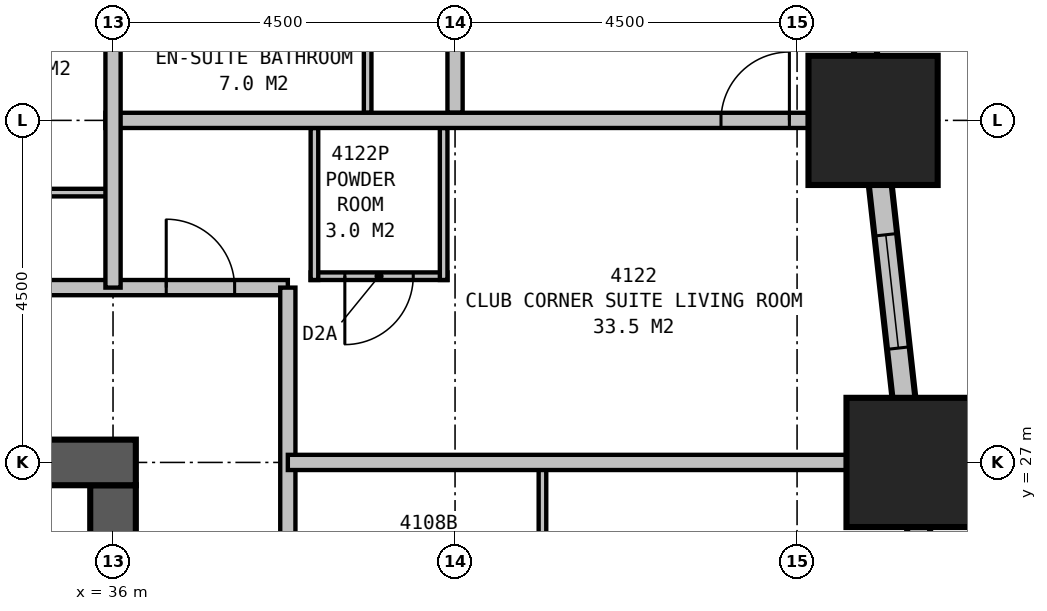
"""IFC4 building model, lengths in metres.
Left out: names, types, materials, properties, quantities, classifications, styles, units other than length and angle.
Written with IfcOpenShell. Run it as: python <this file> out.ifc"""

import sys

from ifc_helpers import new_model, si_unit, direction, frame, frame_2d, origin, origin_2d, place, context, subcontext, project, spatial, rectangle, extrude, element, fill, save


model = new_model("IFC4")
c1 = context("Model", 3, precision=1e-05, world=origin(), true_north=direction((0.0, 1.0)))
c2 = subcontext(c1, "Body", "Model", "MODEL_VIEW")
j1 = project(units=[si_unit("LENGTHUNIT", "METRE"), si_unit("PLANEANGLEUNIT", "RADIAN")], contexts=[c1])
p1 = place(None, origin())
s1 = spatial("IfcSite", under=j1, at=p1, CompositionType="ELEMENT")
p2 = place(p1, origin())
s2 = spatial("IfcBuilding", under=s1, at=p2, CompositionType="ELEMENT")
p3 = place(p2, frame((0.0, 0.0, 162.4)))
s3 = spatial("IfcBuildingStorey", under=s2, at=p3, CompositionType="ELEMENT", Elevation=162.4)
for number, where, z_axis, x_axis in (
    (1, (46.5, 27.0, 0.0), (0.0, 0.0, 1.0), (1.0, 0.0, 0.0)),
    (2, (46.0, 31.5, 0.0), (0.0, 0.0, 1.0), (1.0, 0.0, 0.0)),
):
    element("IfcColumn", number, at=place(p3, frame(where, z_axis=z_axis, x_axis=x_axis)), inside=s3, PredefinedType="COLUMN", context=c2, shape_type="SweptSolid", body=[
        extrude(rectangle(XDim=1.7, YDim=1.7, at=origin_2d()), origin(), (0.0, 0.0, 1.0), 3.5),
    ])
p4 = place(p3, frame((36.3, 27.0, 0.0), z_axis=(0.0, 0.0, 1.0), x_axis=(-1.0, 0.0, 0.0)))
e3 = element("IfcWall", 3, at=p4, inside=s3, PredefinedType="SHEAR", context=c2, shape_type="SweptSolid", body=[
    extrude(rectangle(XDim=23.1, YDim=0.6, at=frame_2d((11.55, 0.0))), origin(), (0.0, 0.0, 1.0), 3.5),
])
p5 = place(p4, frame((17.05, 0.0, 0.0)))
e4 = element("IfcOpeningElement", 4, at=p5, cuts=e3, PredefinedType="OPENING", context=c2, shape_type="SweptSolid", body=[
    extrude(rectangle(XDim=1.0, YDim=2.1, at=frame_2d((0.5, 1.05))), frame((0.0, 0.31, 0.0), z_axis=(0.0, -1.0, 0.0), x_axis=(1.0, 0.0, 0.0)), (0.0, 0.0, 1.0), 0.62),
])
p6 = place(p4, frame((12.05, 0.0, 0.0)))
e5 = element("IfcOpeningElement", 5, at=p6, cuts=e3, PredefinedType="OPENING", context=c2, shape_type="SweptSolid", body=[
    extrude(rectangle(XDim=1.0, YDim=2.1, at=frame_2d((0.5, 1.05))), frame((0.0, 0.31, 0.0), z_axis=(0.0, -1.0, 0.0), x_axis=(1.0, 0.0, 0.0)), (0.0, 0.0, 1.0), 0.62),
])
p7 = place(p4, frame((7.05, 0.0, 0.0)))
e6 = element("IfcOpeningElement", 6, at=p7, cuts=e3, PredefinedType="OPENING", context=c2, shape_type="SweptSolid", body=[
    extrude(rectangle(XDim=1.0, YDim=2.1, at=frame_2d((0.5, 1.05))), frame((0.0, 0.31, 0.0), z_axis=(0.0, -1.0, 0.0), x_axis=(1.0, 0.0, 0.0)), (0.0, 0.0, 1.0), 0.62),
])
p8 = place(p3, frame((36.0, 20.0, 0.0), z_axis=(0.0, 0.0, 1.0), x_axis=(0.0, 1.0, 0.0)))
e7 = element("IfcWall", 7, at=p8, inside=s3, PredefinedType="SHEAR", context=c2, shape_type="SweptSolid", body=[
    extrude(rectangle(XDim=6.7, YDim=0.6, at=frame_2d((3.35, 0.0))), origin(), (0.0, 0.0, 1.0), 3.5),
])
p9 = place(p3, frame((49.017, 4.351, 0.0), z_axis=(0.0, 0.0, 1.0), x_axis=(-0.110433201132, 0.993883548555, 0.0)))
e8 = element("IfcWall", 8, at=p9, inside=s3, PredefinedType="STANDARD", context=c2, shape_type="SweptSolid", body=[
    extrude(rectangle(XDim=31.994, YDim=0.3, at=frame_2d((15.997, 0.0))), origin(), (0.0, 0.0, 1.0), 2.25),
])
p10 = place(p9, frame((1.664, 0.0, 0.5)))
e9 = element("IfcOpeningElement", 9, at=p10, cuts=e8, PredefinedType="OPENING", context=c2, shape_type="SweptSolid", body=[
    extrude(rectangle(XDim=1.5, YDim=1.6, at=frame_2d((0.75, 0.8))), frame((0.0, 0.16, 0.0), z_axis=(0.0, -1.0, 0.0), x_axis=(1.0, 0.0, 0.0)), (0.0, 0.0, 1.0), 0.32),
])
p11 = place(p9, frame((6.192, 0.0, 0.5)))
e10 = element("IfcOpeningElement", 10, at=p11, cuts=e8, PredefinedType="OPENING", context=c2, shape_type="SweptSolid", body=[
    extrude(rectangle(XDim=1.5, YDim=1.6, at=frame_2d((0.75, 0.8))), frame((0.0, 0.16, 0.0), z_axis=(0.0, -1.0, 0.0), x_axis=(1.0, 0.0, 0.0)), (0.0, 0.0, 1.0), 0.32),
])
p12 = place(p9, frame((10.719, 0.0, 0.5)))
e11 = element("IfcOpeningElement", 11, at=p12, cuts=e8, PredefinedType="OPENING", context=c2, shape_type="SweptSolid", body=[
    extrude(rectangle(XDim=1.5, YDim=1.6, at=frame_2d((0.75, 0.8))), frame((0.0, 0.16, 0.0), z_axis=(0.0, -1.0, 0.0), x_axis=(1.0, 0.0, 0.0)), (0.0, 0.0, 1.0), 0.32),
])
p13 = place(p9, frame((15.247, 0.0, 0.5)))
e12 = element("IfcOpeningElement", 12, at=p13, cuts=e8, PredefinedType="OPENING", context=c2, shape_type="SweptSolid", body=[
    extrude(rectangle(XDim=1.5, YDim=1.6, at=frame_2d((0.75, 0.8))), frame((0.0, 0.16, 0.0), z_axis=(0.0, -1.0, 0.0), x_axis=(1.0, 0.0, 0.0)), (0.0, 0.0, 1.0), 0.32),
])
p14 = place(p9, frame((19.775, 0.0, 0.5)))
e13 = element("IfcOpeningElement", 13, at=p14, cuts=e8, PredefinedType="OPENING", context=c2, shape_type="SweptSolid", body=[
    extrude(rectangle(XDim=1.5, YDim=1.6, at=frame_2d((0.75, 0.8))), frame((0.0, 0.16, 0.0), z_axis=(0.0, -1.0, 0.0), x_axis=(1.0, 0.0, 0.0)), (0.0, 0.0, 1.0), 0.32),
])
p15 = place(p9, frame((24.302, 0.0, 0.5)))
e14 = element("IfcOpeningElement", 14, at=p15, cuts=e8, PredefinedType="OPENING", context=c2, shape_type="SweptSolid", body=[
    extrude(rectangle(XDim=1.5, YDim=1.6, at=frame_2d((0.75, 0.8))), frame((0.0, 0.16, 0.0), z_axis=(0.0, -1.0, 0.0), x_axis=(1.0, 0.0, 0.0)), (0.0, 0.0, 1.0), 0.32),
])
p16 = place(p9, frame((28.83, 0.0, 0.5)))
e15 = element("IfcOpeningElement", 15, at=p16, cuts=e8, PredefinedType="OPENING", context=c2, shape_type="SweptSolid", body=[
    extrude(rectangle(XDim=1.5, YDim=1.6, at=frame_2d((0.75, 0.8))), frame((0.0, 0.16, 0.0), z_axis=(0.0, -1.0, 0.0), x_axis=(1.0, 0.0, 0.0)), (0.0, 0.0, 1.0), 0.32),
])
p17 = place(p3, frame((11.2, 29.3, 0.0), z_axis=(0.0, 0.0, 1.0), x_axis=(1.0, 0.0, 0.0)))
e16 = element("IfcWall", 16, at=p17, inside=s3, PredefinedType="PARTITIONING", context=c2, shape_type="SweptSolid", body=[
    extrude(rectangle(XDim=27.1, YDim=0.2, at=frame_2d((13.55, 0.0))), origin(), (0.0, 0.0, 1.0), 3.25),
])
p18 = place(p17, frame((2.75, 0.0, 0.0)))
e17 = element("IfcOpeningElement", 17, at=p18, cuts=e16, PredefinedType="OPENING", context=c2, shape_type="SweptSolid", body=[
    extrude(rectangle(XDim=0.9, YDim=2.1, at=frame_2d((0.45, 1.05))), frame((0.0, 0.11, 0.0), z_axis=(0.0, -1.0, 0.0), x_axis=(1.0, 0.0, 0.0)), (0.0, 0.0, 1.0), 0.22),
])
p19 = place(p17, frame((9.55, 0.0, 0.0)))
e18 = element("IfcOpeningElement", 18, at=p19, cuts=e16, PredefinedType="OPENING", context=c2, shape_type="SweptSolid", body=[
    extrude(rectangle(XDim=0.9, YDim=2.1, at=frame_2d((0.45, 1.05))), frame((0.0, 0.11, 0.0), z_axis=(0.0, -1.0, 0.0), x_axis=(1.0, 0.0, 0.0)), (0.0, 0.0, 1.0), 0.22),
])
p20 = place(p17, frame((16.25, 0.0, 0.0)))
e19 = element("IfcOpeningElement", 19, at=p20, cuts=e16, PredefinedType="OPENING", context=c2, shape_type="SweptSolid", body=[
    extrude(rectangle(XDim=0.9, YDim=2.1, at=frame_2d((0.45, 1.05))), frame((0.0, 0.11, 0.0), z_axis=(0.0, -1.0, 0.0), x_axis=(1.0, 0.0, 0.0)), (0.0, 0.0, 1.0), 0.22),
])
p21 = place(p17, frame((20.75, 0.0, 0.0)))
e20 = element("IfcOpeningElement", 20, at=p21, cuts=e16, PredefinedType="OPENING", context=c2, shape_type="SweptSolid", body=[
    extrude(rectangle(XDim=0.9, YDim=2.1, at=frame_2d((0.45, 1.05))), frame((0.0, 0.11, 0.0), z_axis=(0.0, -1.0, 0.0), x_axis=(1.0, 0.0, 0.0)), (0.0, 0.0, 1.0), 0.22),
])
p22 = place(p17, frame((25.5, 0.0, 0.0)))
e21 = element("IfcOpeningElement", 21, at=p22, cuts=e16, PredefinedType="OPENING", context=c2, shape_type="SweptSolid", body=[
    extrude(rectangle(XDim=0.9, YDim=2.1, at=frame_2d((0.45, 1.05))), frame((0.0, 0.11, 0.0), z_axis=(0.0, -1.0, 0.0), x_axis=(1.0, 0.0, 0.0)), (0.0, 0.0, 1.0), 0.22),
])
p23 = place(p17, frame((0.7, 0.0, 0.0)))
e22 = element("IfcOpeningElement", 22, at=p23, cuts=e16, PredefinedType="OPENING", context=c2, shape_type="SweptSolid", body=[
    extrude(rectangle(XDim=0.9, YDim=2.1, at=frame_2d((0.45, 1.05))), frame((0.0, 0.11, 0.0), z_axis=(0.0, -1.0, 0.0), x_axis=(1.0, 0.0, 0.0)), (0.0, 0.0, 1.0), 0.22),
])
p24 = place(p3, frame((38.3, 10.6, 0.0), z_axis=(0.0, 0.0, 1.0), x_axis=(0.0, 1.0, 0.0)))
e23 = element("IfcWall", 23, at=p24, inside=s3, PredefinedType="PARTITIONING", context=c2, shape_type="SweptSolid", body=[
    extrude(rectangle(XDim=18.7, YDim=0.2, at=frame_2d((9.35, 0.0))), origin(), (0.0, 0.0, 1.0), 3.25),
])
p25 = place(p24, frame((6.95, 0.0, 0.0), z_axis=(0.0, 0.0, 1.0), x_axis=(-1.0, 0.0, 0.0)))
e24 = element("IfcOpeningElement", 24, at=p25, cuts=e23, PredefinedType="OPENING", context=c2, shape_type="SweptSolid", body=[
    extrude(rectangle(XDim=0.9, YDim=2.1, at=frame_2d((0.45, 1.05))), frame((0.0, 0.11, 0.0), z_axis=(0.0, -1.0, 0.0), x_axis=(1.0, 0.0, 0.0)), (0.0, 0.0, 1.0), 0.22),
])
p26 = place(p24, frame((11.05, 0.0, 0.0), z_axis=(0.0, 0.0, 1.0), x_axis=(-1.0, 0.0, 0.0)))
e25 = element("IfcOpeningElement", 25, at=p26, cuts=e23, PredefinedType="OPENING", context=c2, shape_type="SweptSolid", body=[
    extrude(rectangle(XDim=0.9, YDim=2.1, at=frame_2d((0.45, 1.05))), frame((0.0, 0.11, 0.0), z_axis=(0.0, -1.0, 0.0), x_axis=(1.0, 0.0, 0.0)), (0.0, 0.0, 1.0), 0.22),
])
p27 = place(p3, frame((41.65, 23.85, 0.0), z_axis=(0.0, 0.0, 1.0), x_axis=(0.0, 1.0, 0.0)))
e26 = element("IfcWall", 26, at=p27, inside=s3, PredefinedType="PLUMBINGWALL", context=c2, shape_type="SweptSolid", body=[
    extrude(rectangle(XDim=3.15, YDim=0.1, at=frame_2d((1.575, 0.0))), origin(), (0.0, 0.0, 1.0), 3.25),
])
p28 = place(p3, frame((33.2, 30.55, 0.0), z_axis=(0.0, 0.0, 1.0), x_axis=(1.0, 0.0, 0.0)))
e27 = element("IfcWall", 27, at=p28, inside=s3, PredefinedType="PLUMBINGWALL", context=c2, shape_type="SweptSolid", body=[
    extrude(rectangle(XDim=2.8, YDim=0.1, at=frame_2d((1.4, 0.0))), origin(), (0.0, 0.0, 1.0), 3.25),
])
p29 = place(p3, frame((38.3, 27.0, 0.0), z_axis=(0.0, 0.0, 1.0), x_axis=(1.0, 0.0, 0.0)))
e28 = element("IfcWall", 28, at=p29, inside=s3, PredefinedType="PARTITIONING", context=c2, shape_type="SweptSolid", body=[
    extrude(rectangle(XDim=7.977, YDim=0.2, at=frame_2d((3.988, 0.0))), origin(), (0.0, 0.0, 1.0), 1.95),
])
p30 = place(p3, frame((36.0, 29.3, 0.0), z_axis=(0.0, 0.0, 1.0), x_axis=(0.0, 1.0, 0.0)))
e29 = element("IfcWall", 29, at=p30, inside=s3, PredefinedType="PARTITIONING", context=c2, shape_type="SweptSolid", body=[
    extrude(rectangle(XDim=11.2, YDim=0.2, at=frame_2d((5.6, 0.0))), origin(), (0.0, 0.0, 1.0), 2.25),
])
p31 = place(p3, frame((35.9, 31.5, 0.0), z_axis=(0.0, 0.0, 1.0), x_axis=(1.0, 0.0, 0.0)))
e30 = element("IfcWall", 30, at=p31, inside=s3, PredefinedType="PARTITIONING", context=c2, shape_type="SweptSolid", body=[
    extrude(rectangle(XDim=10.099, YDim=0.2, at=frame_2d((5.05, 0.0))), origin(), (0.0, 0.0, 1.0), 3.25),
])
p32 = place(p31, frame((8.099, 0.0, 0.0)))
e31 = element("IfcOpeningElement", 31, at=p32, cuts=e30, PredefinedType="OPENING", context=c2, shape_type="SweptSolid", body=[
    extrude(rectangle(XDim=0.9, YDim=2.1, at=frame_2d((0.45, 1.05))), frame((0.0, 0.11, 0.0), z_axis=(0.0, -1.0, 0.0), x_axis=(1.0, 0.0, 0.0)), (0.0, 0.0, 1.0), 0.22),
])
p33 = place(p3, frame((40.35, 31.4, 0.0), z_axis=(0.0, 0.0, 1.0), x_axis=(0.0, -1.0, 0.0)))
e32 = element("IfcWall", 32, at=p33, inside=s3, PredefinedType="PLUMBINGWALL", context=c2, shape_type="SweptSolid", body=[
    extrude(rectangle(XDim=2.0, YDim=0.1, at=frame_2d((1.0, 0.0))), origin(), (0.0, 0.0, 1.0), 2.25),
])
p34 = place(p3, frame((38.65, 31.4, 0.0), z_axis=(0.0, 0.0, 1.0), x_axis=(0.0, -1.0, 0.0)))
e33 = element("IfcWall", 33, at=p34, inside=s3, PredefinedType="PLUMBINGWALL", context=c2, shape_type="SweptSolid", body=[
    extrude(rectangle(XDim=2.0, YDim=0.1, at=frame_2d((1.0, 0.0))), origin(), (0.0, 0.0, 1.0), 3.25),
])
p35 = place(p3, frame((38.6, 29.45, 0.0), z_axis=(0.0, 0.0, 1.0), x_axis=(1.0, 0.0, 0.0)))
e34 = element("IfcWall", 34, at=p35, inside=s3, PredefinedType="PLUMBINGWALL", context=c2, shape_type="SweptSolid", body=[
    extrude(rectangle(XDim=1.8, YDim=0.1, at=frame_2d((0.9, 0.0))), origin(), (0.0, 0.0, 1.0), 3.25),
])
p36 = place(p35, frame((1.35, 0.0, 0.0), z_axis=(0.0, 0.0, 1.0), x_axis=(-1.0, 0.0, 0.0)))
e35 = element("IfcOpeningElement", 35, at=p36, cuts=e34, PredefinedType="OPENING", context=c2, shape_type="SweptSolid", body=[
    extrude(rectangle(XDim=0.9, YDim=2.1, at=frame_2d((0.45, 1.05))), frame((0.0, 0.06, 0.0), z_axis=(0.0, -1.0, 0.0), x_axis=(1.0, 0.0, 0.0)), (0.0, 0.0, 1.0), 0.12),
])
p37 = place(p3, frame((40.5, 31.6, 0.0), z_axis=(0.0, 0.0, 1.0), x_axis=(0.0, 1.0, 0.0)))
e36 = element("IfcWall", 36, at=p37, inside=s3, PredefinedType="PARTITIONING", context=c2, shape_type="SweptSolid", body=[
    extrude(rectangle(XDim=4.4, YDim=0.2, at=frame_2d((2.2, 0.0))), origin(), (0.0, 0.0, 1.0), 2.25),
])
p38 = place(p37, frame((2.5, 0.0, 0.0)))
e37 = element("IfcOpeningElement", 37, at=p38, cuts=e36, PredefinedType="OPENING", context=c2, shape_type="SweptSolid", body=[
    extrude(rectangle(XDim=0.9, YDim=2.1, at=frame_2d((0.45, 1.05))), frame((0.0, 0.11, 0.0), z_axis=(0.0, -1.0, 0.0), x_axis=(1.0, 0.0, 0.0)), (0.0, 0.0, 1.0), 0.22),
])
p39 = place(p3, frame((39.35, 31.6, 0.0), z_axis=(0.0, 0.0, 1.0), x_axis=(0.0, 1.0, 0.0)))
e38 = element("IfcWall", 38, at=p39, inside=s3, PredefinedType="PLUMBINGWALL", context=c2, shape_type="SweptSolid", body=[
    extrude(rectangle(XDim=2.3, YDim=0.1, at=frame_2d((1.15, 0.0))), origin(), (0.0, 0.0, 1.0), 3.25),
])
p40 = place(p15, origin())
e39 = element("IfcWindow", 39, at=p40, inside=s3, PartitioningType="SINGLE_PANEL", PredefinedType="WINDOW", context=c2, shape_type="SweptSolid", body=[
    extrude(rectangle(XDim=1.5, YDim=1.6, at=frame_2d((0.75, 0.8))), frame((0.0, 0.03, 0.0), z_axis=(0.0, -1.0, 0.0), x_axis=(1.0, 0.0, 0.0)), (0.0, 0.0, 1.0), 0.06),
])
fill(e14, e39)
p41 = place(p22, origin())
e40 = element("IfcDoor", 40, at=p41, inside=s3, OperationType="SINGLE_SWING_LEFT", PredefinedType="DOOR", context=c2, shape_type="SweptSolid", body=[
    extrude(rectangle(XDim=0.9, YDim=2.1, at=frame_2d((0.45, 1.05))), frame((0.0, 0.025, 0.0), z_axis=(0.0, -1.0, 0.0), x_axis=(1.0, 0.0, 0.0)), (0.0, 0.0, 1.0), 0.05),
])
fill(e21, e40)
p42 = place(p32, origin())
e41 = element("IfcDoor", 41, at=p42, inside=s3, OperationType="SINGLE_SWING_RIGHT", PredefinedType="DOOR", context=c2, shape_type="SweptSolid", body=[
    extrude(rectangle(XDim=0.9, YDim=2.1, at=frame_2d((0.45, 1.05))), frame((0.0, 0.025, 0.0), z_axis=(0.0, -1.0, 0.0), x_axis=(1.0, 0.0, 0.0)), (0.0, 0.0, 1.0), 0.05),
])
fill(e31, e41)
p43 = place(p36, origin())
e42 = element("IfcDoor", 42, at=p43, inside=s3, OperationType="SINGLE_SWING_RIGHT", PredefinedType="DOOR", context=c2, shape_type="SweptSolid", body=[
    extrude(rectangle(XDim=0.9, YDim=2.1, at=frame_2d((0.45, 1.05))), frame((0.0, 0.025, 0.0), z_axis=(0.0, -1.0, 0.0), x_axis=(1.0, 0.0, 0.0)), (0.0, 0.0, 1.0), 0.05),
])
fill(e35, e42)
save(model, sys.argv[1])
